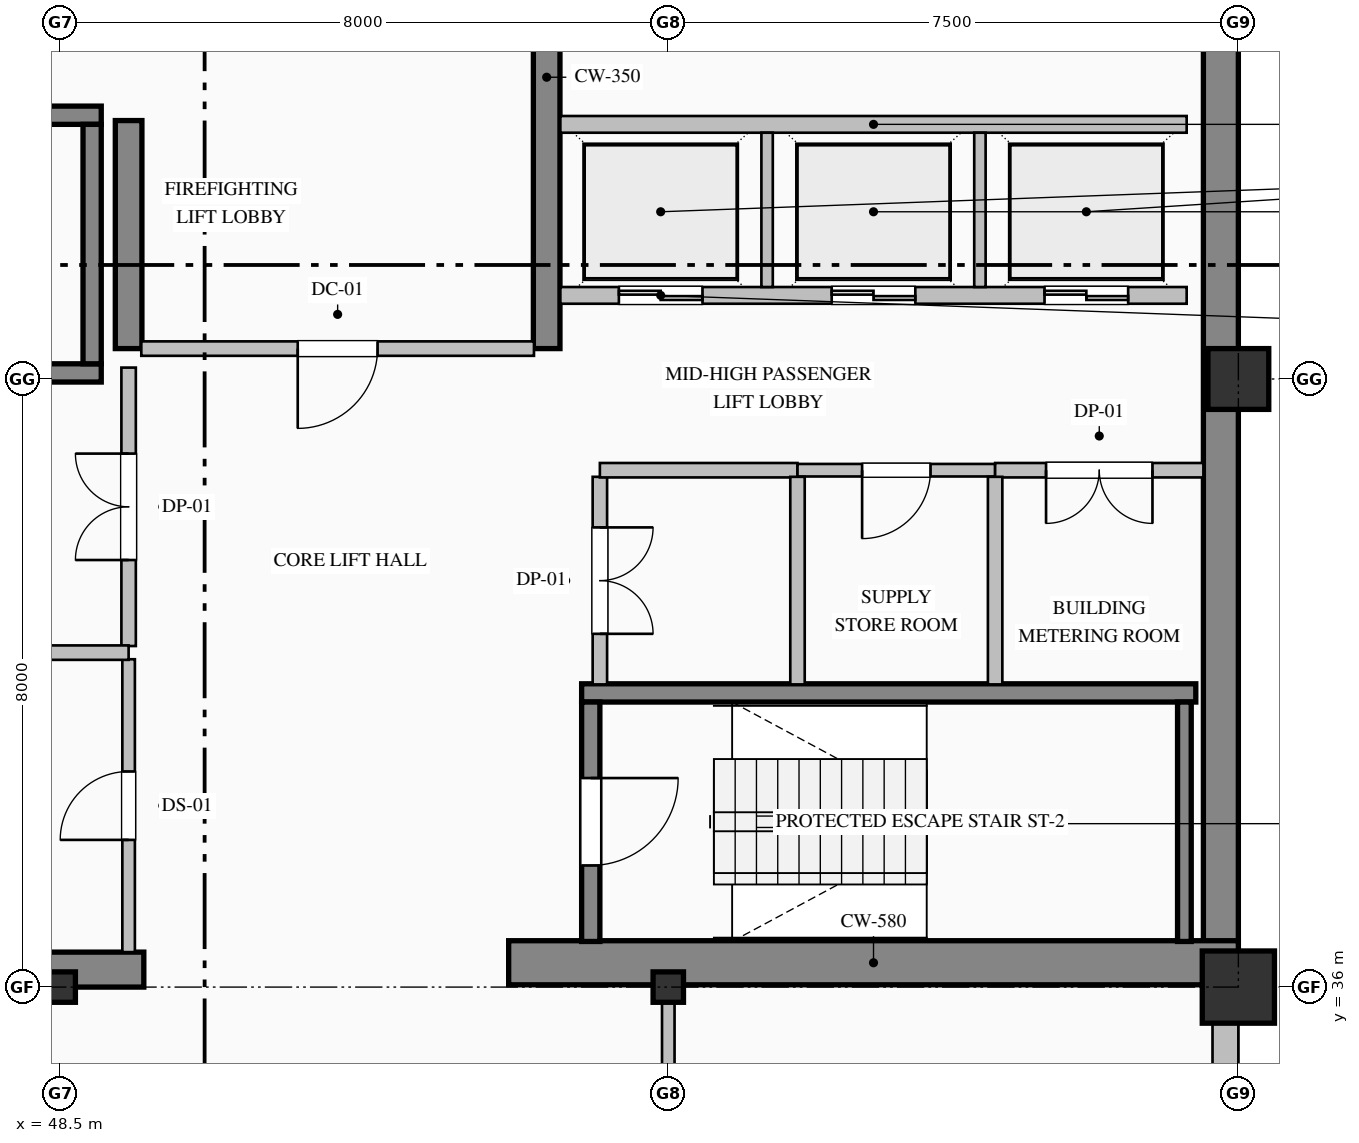
"""IFC4 building model, lengths in metres.
Left out: names, types, materials, properties, quantities, classifications, styles, units other than length and angle.
Written with IfcOpenShell. Run it as: python <this file> out.ifc"""

import sys

from ifc_helpers import new_model, si_unit, direction, frame, frame_2d, origin, origin_2d, place, context, subcontext, project, spatial, rectangle, hollow_rectangle, i_section, extrude, element, fill, save


model = new_model("IFC4")
c1 = context("Model", 3, precision=1e-05, world=origin(), true_north=direction((0.0, 1.0)))
c2 = subcontext(c1, "Body", "Model", "MODEL_VIEW")
j1 = project(units=[si_unit("LENGTHUNIT", "METRE"), si_unit("PLANEANGLEUNIT", "RADIAN")], contexts=[c1])
p1 = place(None, origin())
s1 = spatial("IfcSite", under=j1, at=p1, CompositionType="ELEMENT")
p2 = place(p1, origin())
s2 = spatial("IfcBuilding", under=s1, at=p2, CompositionType="ELEMENT")
p3 = place(p2, frame((0.0, 0.0, 273.8)))
s3 = spatial("IfcBuildingStorey", under=s2, at=p3, CompositionType="ELEMENT", Elevation=273.8)
p4 = place(p3, frame((63.77, 36.32, 0.0), z_axis=(0.0, 0.0, 1.0), x_axis=(0.0, 1.0, 0.0)))
e1 = element("IfcWall", 1, at=p4, inside=s3, PredefinedType="SHEAR", context=c2, shape_type="SweptSolid", body=[
    extrude(rectangle(XDim=15.22, YDim=0.46, at=frame_2d((7.61, 0.0))), origin(), (0.0, 0.0, 1.0), 3.775),
])
p5 = place(p3, frame((40.5, 36.23, 0.0), z_axis=(0.0, 0.0, 1.0), x_axis=(1.0, 0.0, 0.0)))
e2 = element("IfcWall", 2, at=p5, inside=s3, PredefinedType="SHEAR", context=c2, shape_type="SweptSolid", body=[
    extrude(rectangle(XDim=9.1, YDim=0.46, at=frame_2d((4.55, 0.0))), origin(), (0.0, 0.0, 1.0), 3.775),
])
p6 = place(p3, frame((54.4, 36.32, 0.0), z_axis=(0.0, 0.0, 1.0), x_axis=(1.0, 0.0, 0.0)))
e3 = element("IfcWall", 3, at=p6, inside=s3, PredefinedType="SHEAR", context=c2, shape_type="SweptSolid", body=[
    extrude(rectangle(XDim=9.6, YDim=0.58, at=frame_2d((4.8, 0.0))), origin(), (0.0, 0.0, 1.0), 4.0),
])
p7 = place(p3, frame((49.4, 44.4, 0.0), z_axis=(0.0, 0.0, 1.0), x_axis=(0.0, 1.0, 0.0)))
e4 = element("IfcWall", 4, at=p7, inside=s3, PredefinedType="SHEAR", context=c2, shape_type="SweptSolid", body=[
    extrude(rectangle(XDim=3.0, YDim=0.35, at=frame_2d((1.5, 0.0))), origin(), (0.0, 0.0, 1.0), 3.775),
])
p8 = place(p3, frame((54.9, 44.4, 0.0), z_axis=(0.0, 0.0, 1.0), x_axis=(0.0, 1.0, 0.0)))
e5 = element("IfcWall", 5, at=p8, inside=s3, PredefinedType="SHEAR", context=c2, shape_type="SweptSolid", body=[
    extrude(rectangle(XDim=7.14, YDim=0.35, at=frame_2d((3.57, 0.0))), origin(), (0.0, 0.0, 1.0), 3.775),
])
for number, where, z_axis, x_axis in (
    (6, (48.5, 36.0, 0.0), (0.0, 0.0, 1.0), (1.0, 0.0, 0.0)),
    (7, (56.5, 36.0, 0.0), (0.0, 0.0, 1.0), (1.0, 0.0, 0.0)),
):
    element("IfcColumn", number, at=place(p3, frame(where, z_axis=z_axis, x_axis=x_axis)), inside=s3, PredefinedType="COLUMN", context=c2, shape_type="SweptSolid", body=[
        extrude(i_section(OverallWidth=0.4, OverallDepth=0.4, WebThickness=0.013, FlangeThickness=0.021, FilletRadius=0.022, at=origin_2d()), origin(), (0.0, 0.0, 1.0), 4.0),
    ])
p9 = place(p3, frame((64.0, 36.0, 0.0), z_axis=(0.0, 0.0, 1.0), x_axis=(1.0, 0.0, 0.0)))
e8 = element("IfcColumn", 8, at=p9, inside=s3, PredefinedType="COLUMN", context=c2, shape_type="SweptSolid", body=[
    extrude(hollow_rectangle(XDim=0.95, YDim=0.95, WallThickness=0.036, at=origin_2d()), origin(), (0.0, 0.0, 1.0), 4.0),
])
p10 = place(p3, frame((64.0, 44.0, 0.0), z_axis=(0.0, 0.0, 1.0), x_axis=(1.0, 0.0, 0.0)))
e9 = element("IfcColumn", 9, at=p10, inside=s3, PredefinedType="COLUMN", context=c2, shape_type="SweptSolid", body=[
    extrude(hollow_rectangle(XDim=0.8, YDim=0.8, WallThickness=0.032, at=origin_2d()), origin(), (0.0, 0.0, 1.0), 4.0),
])
p11 = place(p3, frame((63.83, 36.05, 0.0), z_axis=(0.0, 0.0, 1.0), x_axis=(0.0, -1.0, 0.0)))
e10 = element("IfcWall", 10, at=p11, inside=s3, PredefinedType="SOLIDWALL", context=c2, shape_type="SweptSolid", body=[
    extrude(rectangle(XDim=19.55, YDim=0.34, at=frame_2d((9.775, 0.0))), origin(), (0.0, 0.0, 1.0), 3.325),
])
p12 = place(p11, frame((10.05, 0.0, 0.7)))
e11 = element("IfcOpeningElement", 11, at=p12, cuts=e10, PredefinedType="OPENING", context=c2, shape_type="SweptSolid", body=[
    extrude(rectangle(XDim=1.5, YDim=2.4, at=frame_2d((0.75, 1.2))), frame((0.0, 0.18, 0.0), z_axis=(0.0, -1.0, 0.0), x_axis=(1.0, 0.0, 0.0)), (0.0, 0.0, 1.0), 0.36),
])
p13 = place(p11, frame((13.8, 0.0, 0.9)))
e12 = element("IfcOpeningElement", 12, at=p13, cuts=e10, PredefinedType="OPENING", context=c2, shape_type="SweptSolid", body=[
    extrude(rectangle(XDim=1.2, YDim=1.85, at=frame_2d((0.6, 0.925))), frame((0.0, 0.18, 0.0), z_axis=(0.0, -1.0, 0.0), x_axis=(1.0, 0.0, 0.0)), (0.0, 0.0, 1.0), 0.36),
])
for number, where, z_axis, x_axis in (
    (13, (40.96, 47.47, 0.0), (0.0, 0.0, 1.0), (1.0, 0.0, 0.0)),
    (14, (49.04, 44.08, 0.0), (0.0, 0.0, 1.0), (-1.0, 0.0, 0.0)),
):
    element("IfcWall", number, at=place(p3, frame(where, z_axis=z_axis, x_axis=x_axis)), inside=s3, PredefinedType="SOLIDWALL", context=c2, shape_type="SweptSolid", body=[
        extrude(rectangle(XDim=8.08, YDim=0.24, at=frame_2d((4.04, 0.0))), origin(), (0.0, 0.0, 1.0), 4.0),
    ])
p14 = place(p3, frame((48.92, 44.2, 0.0), z_axis=(0.0, 0.0, 1.0), x_axis=(0.0, 1.0, 0.0)))
e15 = element("IfcWall", 15, at=p14, inside=s3, PredefinedType="SOLIDWALL", context=c2, shape_type="SweptSolid", body=[
    extrude(rectangle(XDim=3.15, YDim=0.24, at=frame_2d((1.575, 0.0))), origin(), (0.0, 0.0, 1.0), 4.0),
])
p15 = place(p3, frame((55.36, 39.87, 0.0), z_axis=(0.0, 0.0, 1.0), x_axis=(1.0, 0.0, 0.0)))
e16 = element("IfcWall", 16, at=p15, inside=s3, PredefinedType="SOLIDWALL", context=c2, shape_type="SweptSolid", body=[
    extrude(rectangle(XDim=8.08, YDim=0.24, at=frame_2d((4.04, 0.0))), origin(), (0.0, 0.0, 1.0), 4.0),
])
p16 = place(p3, frame((55.48, 39.75, 0.0), z_axis=(0.0, 0.0, 1.0), x_axis=(0.0, -1.0, 0.0)))
e17 = element("IfcWall", 17, at=p16, inside=s3, PredefinedType="SOLIDWALL", context=c2, shape_type="SweptSolid", body=[
    extrude(rectangle(XDim=3.15, YDim=0.24, at=frame_2d((1.575, 0.0))), origin(), (0.0, 0.0, 1.0), 4.0),
])
p17 = place(p16, frame((1.0, 0.0, 0.0)))
e18 = element("IfcOpeningElement", 18, at=p17, cuts=e17, PredefinedType="OPENING", context=c2, shape_type="SweptSolid", body=[
    extrude(rectangle(XDim=1.15, YDim=2.2, at=frame_2d((0.575, 1.1))), frame((0.0, 0.13, 0.0), z_axis=(0.0, -1.0, 0.0), x_axis=(1.0, 0.0, 0.0)), (0.0, 0.0, 1.0), 0.26),
])
p18 = place(p3, frame((63.29, 36.6, 0.0), z_axis=(0.0, 0.0, 1.0), x_axis=(0.0, 1.0, 0.0)))
e19 = element("IfcWall", 19, at=p18, inside=s3, PredefinedType="SOLIDWALL", context=c2, shape_type="SweptSolid", body=[
    extrude(rectangle(XDim=3.15, YDim=0.18, at=frame_2d((1.575, 0.0))), origin(), (0.0, 0.0, 1.0), 4.0),
])
p19 = place(p3, frame((63.32, 45.1, 0.0), z_axis=(0.0, 0.0, 1.0), x_axis=(-1.0, 0.0, 0.0)))
e20 = element("IfcWall", 20, at=p19, inside=s3, PredefinedType="PARTITIONING", context=c2, shape_type="SweptSolid", body=[
    extrude(rectangle(XDim=8.24, YDim=0.22, at=frame_2d((4.12, 0.0))), origin(), (0.0, 0.0, 1.0), 3.775),
])
p20 = place(p19, frame((6.37, 0.0, 0.0)))
e21 = element("IfcOpeningElement", 21, at=p20, cuts=e20, PredefinedType="OPENING", context=c2, shape_type="SweptSolid", body=[
    extrude(rectangle(XDim=1.1, YDim=2.2, at=frame_2d((0.55, 1.1))), frame((0.0, 0.12, 0.0), z_axis=(0.0, -1.0, 0.0), x_axis=(1.0, 0.0, 0.0)), (0.0, 0.0, 1.0), 0.24),
])
p21 = place(p19, frame((3.57, 0.0, 0.0)))
e22 = element("IfcOpeningElement", 22, at=p21, cuts=e20, PredefinedType="OPENING", context=c2, shape_type="SweptSolid", body=[
    extrude(rectangle(XDim=1.1, YDim=2.2, at=frame_2d((0.55, 1.1))), frame((0.0, 0.12, 0.0), z_axis=(0.0, -1.0, 0.0), x_axis=(1.0, 0.0, 0.0)), (0.0, 0.0, 1.0), 0.24),
])
p22 = place(p19, frame((0.77, 0.0, 0.0)))
e23 = element("IfcOpeningElement", 23, at=p22, cuts=e20, PredefinedType="OPENING", context=c2, shape_type="SweptSolid", body=[
    extrude(rectangle(XDim=1.1, YDim=2.2, at=frame_2d((0.55, 1.1))), frame((0.0, 0.12, 0.0), z_axis=(0.0, -1.0, 0.0), x_axis=(1.0, 0.0, 0.0)), (0.0, 0.0, 1.0), 0.24),
])
p23 = place(p3, frame((55.08, 47.35, 0.0), z_axis=(0.0, 0.0, 1.0), x_axis=(1.0, 0.0, 0.0)))
e24 = element("IfcWall", 24, at=p23, inside=s3, PredefinedType="PARTITIONING", context=c2, shape_type="SweptSolid", body=[
    extrude(rectangle(XDim=8.24, YDim=0.22, at=frame_2d((4.12, 0.0))), origin(), (0.0, 0.0, 1.0), 3.775),
])
for number, where, z_axis, x_axis in (
    (25, (57.8, 45.21, 0.0), (0.0, 0.0, 1.0), (0.0, 1.0, 0.0)),
    (26, (60.6, 45.21, 0.0), (0.0, 0.0, 1.0), (0.0, 1.0, 0.0)),
):
    element("IfcWall", number, at=place(p3, frame(where, z_axis=z_axis, x_axis=x_axis)), inside=s3, PredefinedType="PARTITIONING", context=c2, shape_type="SweptSolid", body=[
        extrude(rectangle(XDim=2.03, YDim=0.15, at=frame_2d((1.015, 0.0))), origin(), (0.0, 0.0, 1.0), 3.775),
    ])
p24 = place(p3, frame((54.733, 44.4, 0.0), z_axis=(0.0, 0.0, 1.0), x_axis=(-1.0, 0.0, 0.0)))
e27 = element("IfcWall", 27, at=p24, inside=s3, PredefinedType="PARTITIONING", context=c2, shape_type="SweptSolid", body=[
    extrude(rectangle(XDim=5.166, YDim=0.19, at=frame_2d((2.583, 0.0))), origin(), (0.0, 0.0, 1.0), 3.775),
])
p25 = place(p24, frame((2.058, 0.0, 0.0)))
e28 = element("IfcOpeningElement", 28, at=p25, cuts=e27, PredefinedType="OPENING", context=c2, shape_type="SweptSolid", body=[
    extrude(rectangle(XDim=1.05, YDim=2.15, at=frame_2d((0.525, 1.075))), frame((0.0, 0.105, 0.0), z_axis=(0.0, -1.0, 0.0), x_axis=(1.0, 0.0, 0.0)), (0.0, 0.0, 1.0), 0.21),
])
p26 = place(p3, frame((49.4, 36.46, 0.0), z_axis=(0.0, 0.0, 1.0), x_axis=(0.0, 1.0, 0.0)))
e29 = element("IfcWall", 29, at=p26, inside=s3, PredefinedType="PARTITIONING", context=c2, shape_type="SweptSolid", body=[
    extrude(rectangle(XDim=3.853, YDim=0.165, at=frame_2d((1.927, 0.0))), origin(), (0.0, 0.0, 1.0), 3.017),
])
p27 = place(p26, frame((1.477, 0.0, 0.0)))
e30 = element("IfcOpeningElement", 30, at=p27, cuts=e29, PredefinedType="OPENING", context=c2, shape_type="SweptSolid", body=[
    extrude(rectangle(XDim=0.9, YDim=2.15, at=frame_2d((0.45, 1.075))), frame((0.0, 0.093, 0.0), z_axis=(0.0, -1.0, 0.0), x_axis=(1.0, 0.0, 0.0)), (0.0, 0.0, 1.0), 0.185),
])
p28 = place(p3, frame((49.4, 40.487, 0.0), z_axis=(0.0, 0.0, 1.0), x_axis=(0.0, 1.0, 0.0)))
e31 = element("IfcWall", 31, at=p28, inside=s3, PredefinedType="PARTITIONING", context=c2, shape_type="SweptSolid", body=[
    extrude(rectangle(XDim=3.663, YDim=0.19, at=frame_2d((1.832, 0.0))), origin(), (0.0, 0.0, 1.0), 3.017),
])
p29 = place(p28, frame((1.132, 0.0, 0.0)))
e32 = element("IfcOpeningElement", 32, at=p29, cuts=e31, PredefinedType="OPENING", context=c2, shape_type="SweptSolid", body=[
    extrude(rectangle(XDim=1.4, YDim=2.25, at=frame_2d((0.7, 1.125))), frame((0.0, 0.105, 0.0), z_axis=(0.0, -1.0, 0.0), x_axis=(1.0, 0.0, 0.0)), (0.0, 0.0, 1.0), 0.21),
])
p30 = place(p3, frame((55.6, 42.713, 0.0), z_axis=(0.0, 0.0, 1.0), x_axis=(0.0, -1.0, 0.0)))
e33 = element("IfcWall", 33, at=p30, inside=s3, PredefinedType="PARTITIONING", context=c2, shape_type="SweptSolid", body=[
    extrude(rectangle(XDim=2.731, YDim=0.19, at=frame_2d((1.365, 0.0))), origin(), (0.0, 0.0, 1.0), 3.775),
])
p31 = place(p30, frame((0.666, 0.0, 0.0)))
e34 = element("IfcOpeningElement", 34, at=p31, cuts=e33, PredefinedType="OPENING", context=c2, shape_type="SweptSolid", body=[
    extrude(rectangle(XDim=1.4, YDim=2.25, at=frame_2d((0.7, 1.125))), frame((0.0, 0.105, 0.0), z_axis=(0.0, -1.0, 0.0), x_axis=(1.0, 0.0, 0.0)), (0.0, 0.0, 1.0), 0.21),
])
p32 = place(p3, frame((40.96, 40.4, 0.0), z_axis=(0.0, 0.0, 1.0), x_axis=(1.0, 0.0, 0.0)))
e35 = element("IfcWall", 35, at=p32, inside=s3, PredefinedType="PARTITIONING", context=c2, shape_type="SweptSolid", body=[
    extrude(rectangle(XDim=8.44, YDim=0.19, at=frame_2d((4.22, 0.0))), origin(), (0.0, 0.0, 1.0), 3.775),
])
p33 = place(p3, frame((58.2, 42.8, 0.0), z_axis=(0.0, 0.0, 1.0), x_axis=(-1.0, 0.0, 0.0)))
e36 = element("IfcWall", 36, at=p33, inside=s3, PredefinedType="PARTITIONING", context=c2, shape_type="SweptSolid", body=[
    extrude(rectangle(XDim=2.6, YDim=0.19, at=frame_2d((1.3, 0.0))), origin(), (0.0, 0.0, 1.0), 3.775),
])
p34 = place(p3, frame((60.8, 42.8, 0.0), z_axis=(0.0, 0.0, 1.0), x_axis=(-1.0, 0.0, 0.0)))
e37 = element("IfcWall", 37, at=p34, inside=s3, PredefinedType="PARTITIONING", context=c2, shape_type="SweptSolid", body=[
    extrude(rectangle(XDim=2.6, YDim=0.165, at=frame_2d((1.3, 0.0))), origin(), (0.0, 0.0, 1.0), 3.775),
])
p35 = place(p34, frame((0.85, 0.0, 0.0)))
e38 = element("IfcOpeningElement", 38, at=p35, cuts=e37, PredefinedType="OPENING", context=c2, shape_type="SweptSolid", body=[
    extrude(rectangle(XDim=0.9, YDim=2.15, at=frame_2d((0.45, 1.075))), frame((0.0, 0.093, 0.0), z_axis=(0.0, -1.0, 0.0), x_axis=(1.0, 0.0, 0.0)), (0.0, 0.0, 1.0), 0.185),
])
p36 = place(p3, frame((63.54, 42.8, 0.0), z_axis=(0.0, 0.0, 1.0), x_axis=(-1.0, 0.0, 0.0)))
e39 = element("IfcWall", 39, at=p36, inside=s3, PredefinedType="PARTITIONING", context=c2, shape_type="SweptSolid", body=[
    extrude(rectangle(XDim=2.74, YDim=0.19, at=frame_2d((1.37, 0.0))), origin(), (0.0, 0.0, 1.0), 3.775),
])
p37 = place(p36, frame((0.67, 0.0, 0.0)))
e40 = element("IfcOpeningElement", 40, at=p37, cuts=e39, PredefinedType="OPENING", context=c2, shape_type="SweptSolid", body=[
    extrude(rectangle(XDim=1.4, YDim=2.25, at=frame_2d((0.7, 1.125))), frame((0.0, 0.105, 0.0), z_axis=(0.0, -1.0, 0.0), x_axis=(1.0, 0.0, 0.0)), (0.0, 0.0, 1.0), 0.21),
])
for number, where, z_axis, x_axis in (
    (41, (58.2, 42.713, 0.0), (0.0, 0.0, 1.0), (0.0, -1.0, 0.0)),
    (42, (60.8, 42.713, 0.0), (0.0, 0.0, 1.0), (0.0, -1.0, 0.0)),
):
    element("IfcWall", number, at=place(p3, frame(where, z_axis=z_axis, x_axis=x_axis)), inside=s3, PredefinedType="PARTITIONING", context=c2, shape_type="SweptSolid", body=[
        extrude(rectangle(XDim=2.731, YDim=0.19, at=frame_2d((1.365, 0.0))), origin(), (0.0, 0.0, 1.0), 3.775),
    ])
p38 = place(p3, frame((56.5, 36.0, 0.0), z_axis=(0.0, 0.0, 1.0), x_axis=(0.0, -1.0, 0.0)))
e43 = element("IfcWall", 43, at=p38, inside=s3, PredefinedType="PARTITIONING", context=c2, shape_type="SweptSolid", body=[
    extrude(rectangle(XDim=4.095, YDim=0.165, at=frame_2d((2.048, 0.0))), origin(), (0.0, 0.0, 1.0), 3.179),
])
p39 = place(p38, frame((1.598, 0.0, 0.0)))
e44 = element("IfcOpeningElement", 44, at=p39, cuts=e43, PredefinedType="OPENING", context=c2, shape_type="SweptSolid", body=[
    extrude(rectangle(XDim=0.9, YDim=2.15, at=frame_2d((0.45, 1.075))), frame((0.0, 0.093, 0.0), z_axis=(0.0, -1.0, 0.0), x_axis=(1.0, 0.0, 0.0)), (0.0, 0.0, 1.0), 0.185),
])
p40 = place(p17, origin())
e45 = element("IfcDoor", 45, at=p40, inside=s3, OperationType="SINGLE_SWING_LEFT", PredefinedType="DOOR", context=c2, shape_type="SweptSolid", body=[
    extrude(rectangle(XDim=1.15, YDim=2.2, at=frame_2d((0.575, 1.1))), frame((0.0, 0.025, 0.0), z_axis=(0.0, -1.0, 0.0), x_axis=(1.0, 0.0, 0.0)), (0.0, 0.0, 1.0), 0.05),
])
fill(e18, e45)
p41 = place(p20, origin())
e46 = element("IfcDoor", 46, at=p41, inside=s3, OperationType="DOUBLE_DOOR_SLIDING", PredefinedType="DOOR", context=c2, shape_type="SweptSolid", body=[
    extrude(rectangle(XDim=1.1, YDim=2.2, at=frame_2d((0.55, 1.1))), frame((0.0, 0.025, 0.0), z_axis=(0.0, -1.0, 0.0), x_axis=(1.0, 0.0, 0.0)), (0.0, 0.0, 1.0), 0.05),
])
fill(e21, e46)
p42 = place(p21, origin())
e47 = element("IfcDoor", 47, at=p42, inside=s3, OperationType="DOUBLE_DOOR_SLIDING", PredefinedType="DOOR", context=c2, shape_type="SweptSolid", body=[
    extrude(rectangle(XDim=1.1, YDim=2.2, at=frame_2d((0.55, 1.1))), frame((0.0, 0.025, 0.0), z_axis=(0.0, -1.0, 0.0), x_axis=(1.0, 0.0, 0.0)), (0.0, 0.0, 1.0), 0.05),
])
fill(e22, e47)
p43 = place(p22, origin())
e48 = element("IfcDoor", 48, at=p43, inside=s3, OperationType="DOUBLE_DOOR_SLIDING", PredefinedType="DOOR", context=c2, shape_type="SweptSolid", body=[
    extrude(rectangle(XDim=1.1, YDim=2.2, at=frame_2d((0.55, 1.1))), frame((0.0, 0.025, 0.0), z_axis=(0.0, -1.0, 0.0), x_axis=(1.0, 0.0, 0.0)), (0.0, 0.0, 1.0), 0.05),
])
fill(e23, e48)
p44 = place(p25, origin())
e49 = element("IfcDoor", 49, at=p44, inside=s3, OperationType="SINGLE_SWING_RIGHT", PredefinedType="DOOR", context=c2, shape_type="SweptSolid", body=[
    extrude(rectangle(XDim=1.05, YDim=2.15, at=frame_2d((0.525, 1.075))), frame((0.0, 0.025, 0.0), z_axis=(0.0, -1.0, 0.0), x_axis=(1.0, 0.0, 0.0)), (0.0, 0.0, 1.0), 0.05),
])
fill(e28, e49)
p45 = place(p27, origin())
e50 = element("IfcDoor", 50, at=p45, inside=s3, OperationType="SINGLE_SWING_LEFT", PredefinedType="DOOR", context=c2, shape_type="SweptSolid", body=[
    extrude(rectangle(XDim=0.9, YDim=2.15, at=frame_2d((0.45, 1.075))), frame((0.0, 0.025, 0.0), z_axis=(0.0, -1.0, 0.0), x_axis=(1.0, 0.0, 0.0)), (0.0, 0.0, 1.0), 0.05),
])
fill(e30, e50)
p46 = place(p29, origin())
e51 = element("IfcDoor", 51, at=p46, inside=s3, OperationType="DOUBLE_DOOR_SINGLE_SWING", PredefinedType="DOOR", context=c2, shape_type="SweptSolid", body=[
    extrude(rectangle(XDim=1.4, YDim=2.25, at=frame_2d((0.7, 1.125))), frame((0.0, 0.025, 0.0), z_axis=(0.0, -1.0, 0.0), x_axis=(1.0, 0.0, 0.0)), (0.0, 0.0, 1.0), 0.05),
])
fill(e32, e51)
p47 = place(p31, origin())
e52 = element("IfcDoor", 52, at=p47, inside=s3, OperationType="DOUBLE_DOOR_SINGLE_SWING", PredefinedType="DOOR", context=c2, shape_type="SweptSolid", body=[
    extrude(rectangle(XDim=1.4, YDim=2.25, at=frame_2d((0.7, 1.125))), frame((0.0, 0.025, 0.0), z_axis=(0.0, -1.0, 0.0), x_axis=(1.0, 0.0, 0.0)), (0.0, 0.0, 1.0), 0.05),
])
fill(e34, e52)
p48 = place(p35, origin())
e53 = element("IfcDoor", 53, at=p48, inside=s3, OperationType="SINGLE_SWING_RIGHT", PredefinedType="DOOR", context=c2, shape_type="SweptSolid", body=[
    extrude(rectangle(XDim=0.9, YDim=2.15, at=frame_2d((0.45, 1.075))), frame((0.0, 0.025, 0.0), z_axis=(0.0, -1.0, 0.0), x_axis=(1.0, 0.0, 0.0)), (0.0, 0.0, 1.0), 0.05),
])
fill(e38, e53)
p49 = place(p37, origin())
e54 = element("IfcDoor", 54, at=p49, inside=s3, OperationType="DOUBLE_DOOR_SINGLE_SWING", PredefinedType="DOOR", context=c2, shape_type="SweptSolid", body=[
    extrude(rectangle(XDim=1.4, YDim=2.25, at=frame_2d((0.7, 1.125))), frame((0.0, 0.025, 0.0), z_axis=(0.0, -1.0, 0.0), x_axis=(1.0, 0.0, 0.0)), (0.0, 0.0, 1.0), 0.05),
])
fill(e40, e54)
save(model, sys.argv[1])
